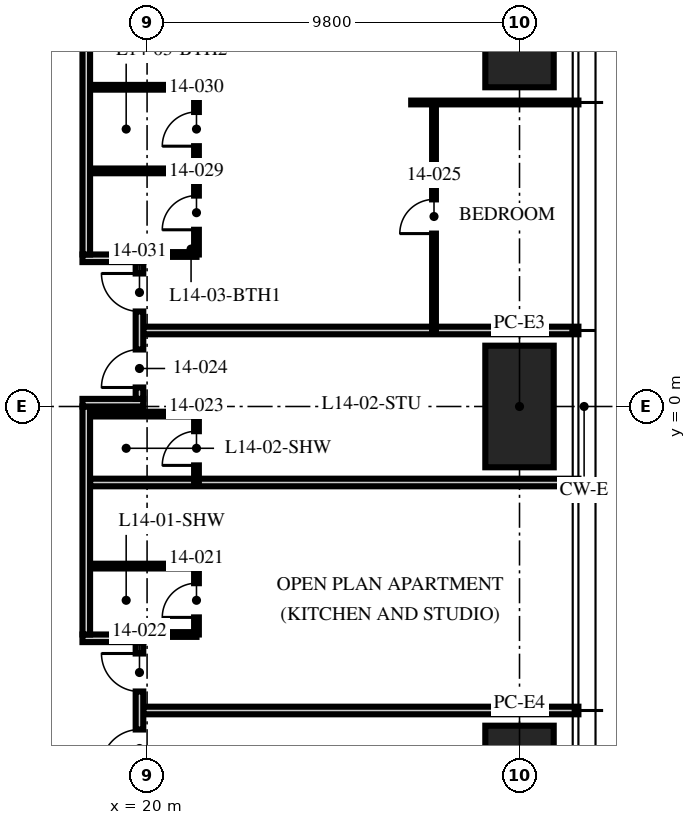
"""IFC4 building model, lengths in metres.
Left out: names, types, materials, properties, quantities, classifications, styles, units other than length and angle.
Written with IfcOpenShell. Run it as: python <this file> out.ifc"""

import sys

from ifc_helpers import new_model, si_unit, direction, frame, frame_2d, origin, origin_2d, place, context, subcontext, project, spatial, rectangle, hollow_rectangle, extrude, element, fill, save


model = new_model("IFC4")
c1 = context("Model", 3, precision=1e-05, world=origin(), true_north=direction((0.0, 1.0)))
c2 = subcontext(c1, "Body", "Model", "MODEL_VIEW")
j1 = project(units=[si_unit("LENGTHUNIT", "METRE"), si_unit("PLANEANGLEUNIT", "RADIAN")], contexts=[c1])
p1 = place(None, origin())
s1 = spatial("IfcSite", under=j1, at=p1, CompositionType="ELEMENT")
p2 = place(p1, origin())
s2 = spatial("IfcBuilding", under=s1, at=p2, CompositionType="ELEMENT")
p3 = place(p2, frame((0.0, 0.0, 58.5)))
s3 = spatial("IfcBuildingStorey", under=s2, at=p3, CompositionType="ELEMENT", Elevation=58.5)
for number, where, z_axis, x_axis in (
    (1, (29.8, 10.0, 0.0), (0.0, 0.0, 1.0), (0.0, 1.0, 0.0)),
    (2, (29.8, 0.0, 0.0), (0.0, 0.0, 1.0), (0.0, 1.0, 0.0)),
    (3, (29.8, -10.0, 0.0), (0.0, 0.0, 1.0), (0.0, 1.0, 0.0)),
):
    element("IfcColumn", number, at=place(p3, frame(where, z_axis=z_axis, x_axis=x_axis)), inside=s3, PredefinedType="COLUMN", context=c2, shape_type="SweptSolid", body=[
        extrude(hollow_rectangle(XDim=3.2, YDim=1.8, WallThickness=0.2, at=origin_2d()), origin(), (0.0, 0.0, 1.0), 3.75),
    ])
p4 = place(p3, frame((19.9, -8.0, 0.0), z_axis=(0.0, 0.0, 1.0), x_axis=(1.0, 0.0, 0.0)))
e4 = element("IfcWall", 4, at=p4, inside=s3, PredefinedType="PARTITIONING", context=c2, shape_type="SweptSolid", body=[
    extrude(rectangle(XDim=11.45, YDim=0.2, at=frame_2d((5.725, 0.0))), origin(), (0.0, 0.0, 1.0), 2.71),
])
p5 = place(p3, frame((18.5, -2.0, 0.0), z_axis=(0.0, 0.0, 1.0), x_axis=(1.0, 0.0, 0.0)))
e5 = element("IfcWall", 5, at=p5, inside=s3, PredefinedType="PARTITIONING", context=c2, shape_type="SweptSolid", body=[
    extrude(rectangle(XDim=12.85, YDim=0.2, at=frame_2d((6.425, 0.0))), origin(), (0.0, 0.0, 1.0), 2.71),
])
p6 = place(p3, frame((19.9, 2.0, 0.0), z_axis=(0.0, 0.0, 1.0), x_axis=(1.0, 0.0, 0.0)))
e6 = element("IfcWall", 6, at=p6, inside=s3, PredefinedType="PARTITIONING", context=c2, shape_type="SweptSolid", body=[
    extrude(rectangle(XDim=11.45, YDim=0.2, at=frame_2d((5.725, 0.0))), origin(), (0.0, 0.0, 1.0), 2.71),
])
p7 = place(p3, frame((26.95, 8.0, 0.0), z_axis=(0.0, 0.0, 1.0), x_axis=(1.0, 0.0, 0.0)))
e7 = element("IfcWall", 7, at=p7, inside=s3, PredefinedType="PARTITIONING", context=c2, shape_type="SweptSolid", body=[
    extrude(rectangle(XDim=4.4, YDim=0.1, at=frame_2d((2.2, 0.0))), origin(), (0.0, 0.0, 1.0), 2.71),
])
p8 = place(p3, frame((21.3, -6.0, 0.0), z_axis=(0.0, 0.0, 1.0), x_axis=(0.0, 1.0, 0.0)))
e8 = element("IfcWall", 8, at=p8, inside=s3, PredefinedType="PARTITIONING", context=c2, shape_type="SweptSolid", body=[
    extrude(rectangle(XDim=1.8, YDim=0.125, at=frame_2d((0.9, 0.0))), origin(), (0.0, 0.0, 1.0), 2.61),
])
p9 = place(p8, frame((0.45, 0.0, 0.0)))
e9 = element("IfcOpeningElement", 9, at=p9, cuts=e8, PredefinedType="OPENING", context=c2, shape_type="SweptSolid", body=[
    extrude(rectangle(XDim=0.9, YDim=2.1, at=frame_2d((0.45, 1.05))), frame((0.0, 0.073, 0.0), z_axis=(0.0, -1.0, 0.0), x_axis=(1.0, 0.0, 0.0)), (0.0, 0.0, 1.0), 0.145),
])
p10 = place(p3, frame((19.97, -6.0, 0.0), z_axis=(0.0, 0.0, 1.0), x_axis=(1.0, 0.0, 0.0)))
e10 = element("IfcWall", 10, at=p10, inside=s3, PredefinedType="PARTITIONING", context=c2, shape_type="SweptSolid", body=[
    extrude(rectangle(XDim=1.33, YDim=0.125, at=frame_2d((0.665, 0.0))), origin(), (0.0, 0.0, 1.0), 3.5),
])
p11 = place(p3, frame((18.5, -4.2, 0.0), z_axis=(0.0, 0.0, 1.0), x_axis=(1.0, 0.0, 0.0)))
e11 = element("IfcWall", 11, at=p11, inside=s3, PredefinedType="PARTITIONING", context=c2, shape_type="SweptSolid", body=[
    extrude(rectangle(XDim=2.8, YDim=0.125, at=frame_2d((1.4, 0.0))), origin(), (0.0, 0.0, 1.0), 3.5),
])
p12 = place(p3, frame((21.3, -2.0, 0.0), z_axis=(0.0, 0.0, 1.0), x_axis=(0.0, 1.0, 0.0)))
e12 = element("IfcWall", 12, at=p12, inside=s3, PredefinedType="PARTITIONING", context=c2, shape_type="SweptSolid", body=[
    extrude(rectangle(XDim=1.8, YDim=0.125, at=frame_2d((0.9, 0.0))), origin(), (0.0, 0.0, 1.0), 3.5),
])
p13 = place(p12, frame((0.45, 0.0, 0.0)))
e13 = element("IfcOpeningElement", 13, at=p13, cuts=e12, PredefinedType="OPENING", context=c2, shape_type="SweptSolid", body=[
    extrude(rectangle(XDim=0.9, YDim=2.1, at=frame_2d((0.45, 1.05))), frame((0.0, 0.073, 0.0), z_axis=(0.0, -1.0, 0.0), x_axis=(1.0, 0.0, 0.0)), (0.0, 0.0, 1.0), 0.145),
])
p14 = place(p3, frame((18.5, -0.2, 0.0), z_axis=(0.0, 0.0, 1.0), x_axis=(1.0, 0.0, 0.0)))
e14 = element("IfcWall", 14, at=p14, inside=s3, PredefinedType="PARTITIONING", context=c2, shape_type="SweptSolid", body=[
    extrude(rectangle(XDim=2.8, YDim=0.125, at=frame_2d((1.4, 0.0))), origin(), (0.0, 0.0, 1.0), 2.492),
])
p15 = place(p3, frame((27.55, 2.0, 0.0), z_axis=(0.0, 0.0, 1.0), x_axis=(0.0, 1.0, 0.0)))
e15 = element("IfcWall", 15, at=p15, inside=s3, PredefinedType="PARTITIONING", context=c2, shape_type="SweptSolid", body=[
    extrude(rectangle(XDim=6.0, YDim=0.1, at=frame_2d((3.0, 0.0))), origin(), (0.0, 0.0, 1.0), 2.61),
])
p16 = place(p15, frame((2.55, 0.0, 0.0)))
e16 = element("IfcOpeningElement", 16, at=p16, cuts=e15, PredefinedType="OPENING", context=c2, shape_type="SweptSolid", body=[
    extrude(rectangle(XDim=0.9, YDim=2.1, at=frame_2d((0.45, 1.05))), frame((0.0, 0.06, 0.0), z_axis=(0.0, -1.0, 0.0), x_axis=(1.0, 0.0, 0.0)), (0.0, 0.0, 1.0), 0.12),
])
p17 = place(p3, frame((21.3, 4.0, 0.0), z_axis=(0.0, 0.0, 1.0), x_axis=(0.0, 1.0, 0.0)))
e17 = element("IfcWall", 17, at=p17, inside=s3, PredefinedType="PARTITIONING", context=c2, shape_type="SweptSolid", body=[
    extrude(rectangle(XDim=4.4, YDim=0.125, at=frame_2d((2.2, 0.0))), origin(), (0.0, 0.0, 1.0), 2.61),
])
p18 = place(p17, frame((0.65, 0.0, 0.0)))
e18 = element("IfcOpeningElement", 18, at=p18, cuts=e17, PredefinedType="OPENING", context=c2, shape_type="SweptSolid", body=[
    extrude(rectangle(XDim=0.9, YDim=2.1, at=frame_2d((0.45, 1.05))), frame((0.0, 0.073, 0.0), z_axis=(0.0, -1.0, 0.0), x_axis=(1.0, 0.0, 0.0)), (0.0, 0.0, 1.0), 0.145),
])
p19 = place(p17, frame((2.85, 0.0, 0.0)))
e19 = element("IfcOpeningElement", 19, at=p19, cuts=e17, PredefinedType="OPENING", context=c2, shape_type="SweptSolid", body=[
    extrude(rectangle(XDim=0.9, YDim=2.1, at=frame_2d((0.45, 1.05))), frame((0.0, 0.073, 0.0), z_axis=(0.0, -1.0, 0.0), x_axis=(1.0, 0.0, 0.0)), (0.0, 0.0, 1.0), 0.145),
])
p20 = place(p3, frame((19.97, 4.0, 0.0), z_axis=(0.0, 0.0, 1.0), x_axis=(1.0, 0.0, 0.0)))
e20 = element("IfcWall", 20, at=p20, inside=s3, PredefinedType="PARTITIONING", context=c2, shape_type="SweptSolid", body=[
    extrude(rectangle(XDim=1.33, YDim=0.125, at=frame_2d((0.665, 0.0))), origin(), (0.0, 0.0, 1.0), 3.5),
])
for number, where, z_axis, x_axis in (
    (21, (18.5, 6.2, 0.0), (0.0, 0.0, 1.0), (1.0, 0.0, 0.0)),
    (22, (18.5, 8.4, 0.0), (0.0, 0.0, 1.0), (1.0, 0.0, 0.0)),
):
    element("IfcWall", number, at=place(p3, frame(where, z_axis=z_axis, x_axis=x_axis)), inside=s3, PredefinedType="PARTITIONING", context=c2, shape_type="SweptSolid", body=[
        extrude(rectangle(XDim=2.8, YDim=0.125, at=frame_2d((1.4, 0.0))), origin(), (0.0, 0.0, 1.0), 3.5),
    ])
p21 = place(p3, frame((18.3, -6.1, 0.0), z_axis=(0.0, 0.0, 1.0), x_axis=(1.0, 0.0, 0.0)))
e23 = element("IfcWall", 23, at=p21, inside=s3, PredefinedType="PARTITIONING", context=c2, shape_type="SweptSolid", body=[
    extrude(rectangle(XDim=1.6, YDim=0.2, at=frame_2d((0.8, 0.0))), origin(), (0.0, 0.0, 1.0), 3.5),
])
p22 = place(p3, frame((19.8, -9.8, 0.0), z_axis=(0.0, 0.0, 1.0), x_axis=(0.0, 1.0, 0.0)))
e24 = element("IfcWall", 24, at=p22, inside=s3, PredefinedType="PARTITIONING", context=c2, shape_type="SweptSolid", body=[
    extrude(rectangle(XDim=3.6, YDim=0.2, at=frame_2d((1.8, 0.0))), origin(), (0.0, 0.0, 1.0), 3.5),
])
p23 = place(p22, frame((2.3, 0.0, 0.0)))
e25 = element("IfcOpeningElement", 25, at=p23, cuts=e24, PredefinedType="OPENING", context=c2, shape_type="SweptSolid", body=[
    extrude(rectangle(XDim=1.0, YDim=2.2, at=frame_2d((0.5, 1.1))), frame((0.0, 0.11, 0.0), z_axis=(0.0, -1.0, 0.0), x_axis=(1.0, 0.0, 0.0)), (0.0, 0.0, 1.0), 0.22),
])
p24 = place(p22, frame((0.3, 0.0, 0.0)))
e26 = element("IfcOpeningElement", 26, at=p24, cuts=e24, PredefinedType="OPENING", context=c2, shape_type="SweptSolid", body=[
    extrude(rectangle(XDim=1.0, YDim=2.2, at=frame_2d((0.5, 1.1))), frame((0.0, 0.11, 0.0), z_axis=(0.0, -1.0, 0.0), x_axis=(1.0, 0.0, 0.0)), (0.0, 0.0, 1.0), 0.22),
])
p25 = place(p3, frame((18.4, -6.0, 0.0), z_axis=(0.0, 0.0, 1.0), x_axis=(0.0, 1.0, 0.0)))
e27 = element("IfcWall", 27, at=p25, inside=s3, PredefinedType="PARTITIONING", context=c2, shape_type="SweptSolid", body=[
    extrude(rectangle(XDim=6.0, YDim=0.2, at=frame_2d((3.0, 0.0))), origin(), (0.0, 0.0, 1.0), 2.492),
])
p26 = place(p3, frame((18.3, 0.1, 0.0), z_axis=(0.0, 0.0, 1.0), x_axis=(1.0, 0.0, 0.0)))
e28 = element("IfcWall", 28, at=p26, inside=s3, PredefinedType="PARTITIONING", context=c2, shape_type="SweptSolid", body=[
    extrude(rectangle(XDim=1.6, YDim=0.2, at=frame_2d((0.8, 0.0))), origin(), (0.0, 0.0, 1.0), 2.492),
])
p27 = place(p3, frame((18.3, 3.9, 0.0), z_axis=(0.0, 0.0, 1.0), x_axis=(1.0, 0.0, 0.0)))
e29 = element("IfcWall", 29, at=p27, inside=s3, PredefinedType="PARTITIONING", context=c2, shape_type="SweptSolid", body=[
    extrude(rectangle(XDim=1.6, YDim=0.2, at=frame_2d((0.8, 0.0))), origin(), (0.0, 0.0, 1.0), 3.5),
])
p28 = place(p3, frame((19.8, 0.2, 0.0), z_axis=(0.0, 0.0, 1.0), x_axis=(0.0, 1.0, 0.0)))
e30 = element("IfcWall", 30, at=p28, inside=s3, PredefinedType="PARTITIONING", context=c2, shape_type="SweptSolid", body=[
    extrude(rectangle(XDim=3.6, YDim=0.2, at=frame_2d((1.8, 0.0))), origin(), (0.0, 0.0, 1.0), 3.5),
])
p29 = place(p28, frame((0.3, 0.0, 0.0)))
e31 = element("IfcOpeningElement", 31, at=p29, cuts=e30, PredefinedType="OPENING", context=c2, shape_type="SweptSolid", body=[
    extrude(rectangle(XDim=1.0, YDim=2.2, at=frame_2d((0.5, 1.1))), frame((0.0, 0.11, 0.0), z_axis=(0.0, -1.0, 0.0), x_axis=(1.0, 0.0, 0.0)), (0.0, 0.0, 1.0), 0.22),
])
p30 = place(p28, frame((2.3, 0.0, 0.0)))
e32 = element("IfcOpeningElement", 32, at=p30, cuts=e30, PredefinedType="OPENING", context=c2, shape_type="SweptSolid", body=[
    extrude(rectangle(XDim=1.0, YDim=2.2, at=frame_2d((0.5, 1.1))), frame((0.0, 0.11, 0.0), z_axis=(0.0, -1.0, 0.0), x_axis=(1.0, 0.0, 0.0)), (0.0, 0.0, 1.0), 0.22),
])
p31 = place(p3, frame((18.4, 4.0, 0.0), z_axis=(0.0, 0.0, 1.0), x_axis=(0.0, 1.0, 0.0)))
e33 = element("IfcWall", 33, at=p31, inside=s3, PredefinedType="PARTITIONING", context=c2, shape_type="SweptSolid", body=[
    extrude(rectangle(XDim=14.3, YDim=0.2, at=frame_2d((7.15, 0.0))), origin(), (0.0, 0.0, 1.0), 2.3),
])
p32 = place(p9, origin())
e34 = element("IfcDoor", 34, at=p32, inside=s3, OperationType="SINGLE_SWING_LEFT", PredefinedType="DOOR", context=c2, shape_type="SweptSolid", body=[
    extrude(rectangle(XDim=0.9, YDim=2.1, at=frame_2d((0.45, 1.05))), frame((0.0, 0.025, 0.0), z_axis=(0.0, -1.0, 0.0), x_axis=(1.0, 0.0, 0.0)), (0.0, 0.0, 1.0), 0.05),
])
fill(e9, e34)
p33 = place(p23, origin())
e35 = element("IfcDoor", 35, at=p33, inside=s3, OperationType="SINGLE_SWING_RIGHT", PredefinedType="DOOR", context=c2, shape_type="SweptSolid", body=[
    extrude(rectangle(XDim=1.0, YDim=2.2, at=frame_2d((0.5, 1.1))), frame((0.0, 0.025, 0.0), z_axis=(0.0, -1.0, 0.0), x_axis=(1.0, 0.0, 0.0)), (0.0, 0.0, 1.0), 0.05),
])
fill(e25, e35)
p34 = place(p13, origin())
e36 = element("IfcDoor", 36, at=p34, inside=s3, OperationType="SINGLE_SWING_LEFT", PredefinedType="DOOR", context=c2, shape_type="SweptSolid", body=[
    extrude(rectangle(XDim=0.9, YDim=2.1, at=frame_2d((0.45, 1.05))), frame((0.0, 0.025, 0.0), z_axis=(0.0, -1.0, 0.0), x_axis=(1.0, 0.0, 0.0)), (0.0, 0.0, 1.0), 0.05),
])
fill(e13, e36)
p35 = place(p29, origin())
e37 = element("IfcDoor", 37, at=p35, inside=s3, OperationType="SINGLE_SWING_LEFT", PredefinedType="DOOR", context=c2, shape_type="SweptSolid", body=[
    extrude(rectangle(XDim=1.0, YDim=2.2, at=frame_2d((0.5, 1.1))), frame((0.0, 0.025, 0.0), z_axis=(0.0, -1.0, 0.0), x_axis=(1.0, 0.0, 0.0)), (0.0, 0.0, 1.0), 0.05),
])
fill(e31, e37)
p36 = place(p16, origin())
e38 = element("IfcDoor", 38, at=p36, inside=s3, OperationType="SINGLE_SWING_LEFT", PredefinedType="DOOR", context=c2, shape_type="SweptSolid", body=[
    extrude(rectangle(XDim=0.9, YDim=2.1, at=frame_2d((0.45, 1.05))), frame((0.0, 0.025, 0.0), z_axis=(0.0, -1.0, 0.0), x_axis=(1.0, 0.0, 0.0)), (0.0, 0.0, 1.0), 0.05),
])
fill(e16, e38)
p37 = place(p18, origin())
e39 = element("IfcDoor", 39, at=p37, inside=s3, OperationType="SINGLE_SWING_LEFT", PredefinedType="DOOR", context=c2, shape_type="SweptSolid", body=[
    extrude(rectangle(XDim=0.9, YDim=2.1, at=frame_2d((0.45, 1.05))), frame((0.0, 0.025, 0.0), z_axis=(0.0, -1.0, 0.0), x_axis=(1.0, 0.0, 0.0)), (0.0, 0.0, 1.0), 0.05),
])
fill(e18, e39)
p38 = place(p19, origin())
e40 = element("IfcDoor", 40, at=p38, inside=s3, OperationType="SINGLE_SWING_LEFT", PredefinedType="DOOR", context=c2, shape_type="SweptSolid", body=[
    extrude(rectangle(XDim=0.9, YDim=2.1, at=frame_2d((0.45, 1.05))), frame((0.0, 0.025, 0.0), z_axis=(0.0, -1.0, 0.0), x_axis=(1.0, 0.0, 0.0)), (0.0, 0.0, 1.0), 0.05),
])
fill(e19, e40)
p39 = place(p30, origin())
e41 = element("IfcDoor", 41, at=p39, inside=s3, OperationType="SINGLE_SWING_RIGHT", PredefinedType="DOOR", context=c2, shape_type="SweptSolid", body=[
    extrude(rectangle(XDim=1.0, YDim=2.2, at=frame_2d((0.5, 1.1))), frame((0.0, 0.025, 0.0), z_axis=(0.0, -1.0, 0.0), x_axis=(1.0, 0.0, 0.0)), (0.0, 0.0, 1.0), 0.05),
])
fill(e32, e41)
p40 = place(p24, origin())
e42 = element("IfcDoor", 42, at=p40, inside=s3, OperationType="SINGLE_SWING_LEFT", PredefinedType="DOOR", context=c2, shape_type="SweptSolid", body=[
    extrude(rectangle(XDim=1.0, YDim=2.2, at=frame_2d((0.5, 1.1))), frame((0.0, 0.025, 0.0), z_axis=(0.0, -1.0, 0.0), x_axis=(1.0, 0.0, 0.0)), (0.0, 0.0, 1.0), 0.05),
])
fill(e26, e42)
save(model, sys.argv[1])
